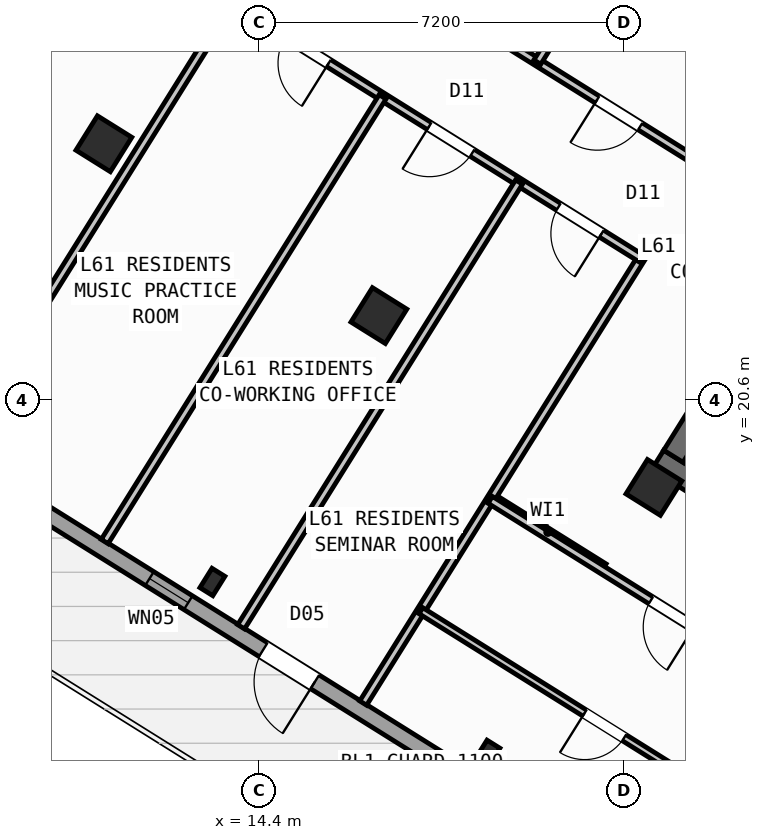
"""IFC4 building model, lengths in metres.
Left out: names, types, materials, properties, quantities, classifications, styles, units other than length and angle.
Written with IfcOpenShell. Run it as: python <this file> out.ifc"""

import sys

from ifc_helpers import new_model, si_unit, direction, frame, frame_2d, origin, origin_2d, place, context, subcontext, project, spatial, rectangle, hollow_rectangle, i_section, extrude, source, transform, mapped, element, fill, save


model = new_model("IFC4")
c1 = context("Model", 3, precision=1e-05, world=origin(), true_north=direction((0.0, 1.0)))
c2 = subcontext(c1, "Body", "Model", "MODEL_VIEW")
j1 = project(units=[si_unit("LENGTHUNIT", "METRE"), si_unit("PLANEANGLEUNIT", "RADIAN")], contexts=[c1])
p1 = place(None, origin())
s1 = spatial("IfcSite", under=j1, at=p1, CompositionType="ELEMENT")
p2 = place(p1, origin())
s2 = spatial("IfcBuilding", under=s1, at=p2, CompositionType="ELEMENT")
p3 = place(p2, frame((0.0, 0.0, 242.1)))
s3 = spatial("IfcBuildingStorey", under=s2, at=p3, CompositionType="ELEMENT", Elevation=242.1)
p4 = place(p3, frame((33.324, 12.503, 0.0), z_axis=(0.0, 0.0, 1.0), x_axis=(-0.848043529849, 0.529926571782, 0.0)))
e1 = element("IfcWall", 1, at=p4, inside=s3, PredefinedType="SHEAR", context=c2, shape_type="SweptSolid", body=[
    extrude(rectangle(XDim=13.04, YDim=0.45, at=frame_2d((6.52, 0.0))), origin(), (0.0, 0.0, 1.0), 3.32),
])
p5 = place(p3, frame((26.007, 24.976, 0.0), z_axis=(0.0, 0.0, 1.0), x_axis=(-0.529931155655, -0.848040665456, 0.0)))
e2 = element("IfcWall", 2, at=p5, inside=s3, PredefinedType="SHEAR", context=c2, shape_type="SweptSolid", body=[
    extrude(rectangle(XDim=6.475, YDim=0.45, at=frame_2d((3.238, 0.0))), origin(), (0.0, 0.0, 1.0), 3.32),
])
m1 = source(origin(), c2, "Body", "SweptSolid", [
    extrude(hollow_rectangle(XDim=0.8, YDim=0.8, WallThickness=0.032, at=origin_2d()), origin(), (0.0, 0.0, 1.0), 3.6),
])
p6 = place(p3, frame((22.191, 18.87, 0.0), z_axis=(0.0, 0.0, 1.0), x_axis=(-0.848048096156, 0.529919264233, 0.0)))
e3 = element("IfcColumn", 3, at=p6, inside=s3, PredefinedType="COLUMN", context=c2, shape_type="MappedRepresentation", body=[
    mapped(m1, transform((0.0, 0.0, 0.0), scale=1.0)),
])
m2 = source(origin(), c2, "Body", "SweptSolid", [
    extrude(i_section(OverallWidth=0.3, OverallDepth=0.45, WebThickness=0.014, FlangeThickness=0.026, at=origin_2d()), origin(), (0.0, 0.0, 1.0), 3.6),
])
p7 = place(p3, frame((18.906, 13.612, 0.0), z_axis=(0.0, 0.0, 1.0), x_axis=(-0.848048096156, 0.529919264233, 0.0)))
e4 = element("IfcColumn", 4, at=p7, inside=s3, PredefinedType="COLUMN", context=c2, shape_type="MappedRepresentation", body=[
    mapped(m2, transform((0.0, 0.0, 0.0), scale=1.0)),
])
p8 = place(p3, frame((16.764, 22.261, 0.0), z_axis=(0.0, 0.0, 1.0), x_axis=(-0.848048096156, 0.529919264233, 0.0)))
e5 = element("IfcColumn", 5, at=p8, inside=s3, PredefinedType="COLUMN", context=c2, shape_type="MappedRepresentation", body=[
    mapped(m1, transform((0.0, 0.0, 0.0), scale=1.0)),
])
p9 = place(p3, frame((13.478, 17.003, 0.0), z_axis=(0.0, 0.0, 1.0), x_axis=(-0.848048096156, 0.529919264233, 0.0)))
e6 = element("IfcColumn", 6, at=p9, inside=s3, PredefinedType="COLUMN", context=c2, shape_type="MappedRepresentation", body=[
    mapped(m2, transform((0.0, 0.0, 0.0), scale=1.0)),
])
p10 = place(p3, frame((11.336, 25.653, 0.0), z_axis=(0.0, 0.0, 1.0), x_axis=(-0.848048096156, 0.529919264233, 0.0)))
e7 = element("IfcColumn", 7, at=p10, inside=s3, PredefinedType="COLUMN", context=c2, shape_type="MappedRepresentation", body=[
    mapped(m1, transform((0.0, 0.0, 0.0), scale=1.0)),
])
p11 = place(p3, frame((29.268, 6.429, 0.0), z_axis=(0.0, 0.0, 1.0), x_axis=(-0.848049971435, 0.529916263149, 0.0)))
e8 = element("IfcWall", 8, at=p11, inside=s3, PredefinedType="STANDARD", context=c2, shape_type="SweptSolid", body=[
    extrude(rectangle(XDim=31.588, YDim=0.32, at=frame_2d((15.794, 0.0))), origin(), (0.0, 0.0, 1.0), 3.32),
])
p12 = place(p11, frame((16.235, 0.0, 0.0)))
e9 = element("IfcOpeningElement", 9, at=p12, cuts=e8, PredefinedType="OPENING", context=c2, shape_type="SweptSolid", body=[
    extrude(rectangle(XDim=1.2, YDim=2.15, at=frame_2d((0.6, 1.075))), frame((0.0, 0.17, 0.0), z_axis=(0.0, -1.0, 0.0), x_axis=(1.0, 0.0, 0.0)), (0.0, 0.0, 1.0), 0.34),
])
p13 = place(p11, frame((3.859, 0.0, 0.9)))
e10 = element("IfcOpeningElement", 10, at=p13, cuts=e8, PredefinedType="OPENING", context=c2, shape_type="SweptSolid", body=[
    extrude(rectangle(XDim=1.65, YDim=1.45, at=frame_2d((0.825, 0.725))), frame((0.0, 0.17, 0.0), z_axis=(0.0, -1.0, 0.0), x_axis=(1.0, 0.0, 0.0)), (0.0, 0.0, 1.0), 0.34),
])
p14 = place(p11, frame((10.519, 0.0, 0.9)))
e11 = element("IfcOpeningElement", 11, at=p14, cuts=e8, PredefinedType="OPENING", context=c2, shape_type="SweptSolid", body=[
    extrude(rectangle(XDim=1.65, YDim=1.45, at=frame_2d((0.825, 0.725))), frame((0.0, 0.17, 0.0), z_axis=(0.0, -1.0, 0.0), x_axis=(1.0, 0.0, 0.0)), (0.0, 0.0, 1.0), 0.34),
])
p15 = place(p11, frame((19.182, 0.0, 1.0)))
e12 = element("IfcOpeningElement", 12, at=p15, cuts=e8, PredefinedType="OPENING", context=c2, shape_type="SweptSolid", body=[
    extrude(rectangle(XDim=0.9, YDim=1.25, at=frame_2d((0.45, 0.625))), frame((0.0, 0.17, 0.0), z_axis=(0.0, -1.0, 0.0), x_axis=(1.0, 0.0, 0.0)), (0.0, 0.0, 1.0), 0.34),
])
p16 = place(p11, frame((22.524, 0.0, 1.0)))
e13 = element("IfcOpeningElement", 13, at=p16, cuts=e8, PredefinedType="OPENING", context=c2, shape_type="SweptSolid", body=[
    extrude(rectangle(XDim=0.9, YDim=1.25, at=frame_2d((0.45, 0.625))), frame((0.0, 0.17, 0.0), z_axis=(0.0, -1.0, 0.0), x_axis=(1.0, 0.0, 0.0)), (0.0, 0.0, 1.0), 0.34),
])
p17 = place(p11, frame((25.658, 0.0, 0.9)))
e14 = element("IfcOpeningElement", 14, at=p17, cuts=e8, PredefinedType="OPENING", context=c2, shape_type="SweptSolid", body=[
    extrude(rectangle(XDim=1.65, YDim=1.45, at=frame_2d((0.825, 0.725))), frame((0.0, 0.17, 0.0), z_axis=(0.0, -1.0, 0.0), x_axis=(1.0, 0.0, 0.0)), (0.0, 0.0, 1.0), 0.34),
])
p18 = place(p11, frame((29.278, 0.0, 0.9)))
e15 = element("IfcOpeningElement", 15, at=p18, cuts=e8, PredefinedType="OPENING", context=c2, shape_type="SweptSolid", body=[
    extrude(rectangle(XDim=1.35, YDim=1.45, at=frame_2d((0.675, 0.725))), frame((0.0, 0.17, 0.0), z_axis=(0.0, -1.0, 0.0), x_axis=(1.0, 0.0, 0.0)), (0.0, 0.0, 1.0), 0.34),
])
p19 = place(p3, frame((2.415, 23.452, 0.0), z_axis=(0.0, 0.0, 1.0), x_axis=(0.52991049553, 0.848053575387, 0.0)))
e16 = element("IfcWall", 16, at=p19, inside=s3, PredefinedType="STANDARD", context=c2, shape_type="SweptSolid", body=[
    extrude(rectangle(XDim=21.587, YDim=0.32, at=frame_2d((10.794, 0.0))), origin(), (0.0, 0.0, 1.0), 2.845),
])
p20 = place(p19, frame((2.581, 0.0, 0.9)))
e17 = element("IfcOpeningElement", 17, at=p20, cuts=e16, PredefinedType="OPENING", context=c2, shape_type="SweptSolid", body=[
    extrude(rectangle(XDim=1.65, YDim=1.45, at=frame_2d((0.825, 0.725))), frame((0.0, 0.17, 0.0), z_axis=(0.0, -1.0, 0.0), x_axis=(1.0, 0.0, 0.0)), (0.0, 0.0, 1.0), 0.34),
])
p21 = place(p19, frame((7.879, 0.0, 0.9)))
e18 = element("IfcOpeningElement", 18, at=p21, cuts=e16, PredefinedType="OPENING", context=c2, shape_type="SweptSolid", body=[
    extrude(rectangle(XDim=1.35, YDim=1.45, at=frame_2d((0.675, 0.725))), frame((0.0, 0.17, 0.0), z_axis=(0.0, -1.0, 0.0), x_axis=(1.0, 0.0, 0.0)), (0.0, 0.0, 1.0), 0.34),
])
p22 = place(p19, frame((16.954, 0.0, 0.95)))
e19 = element("IfcOpeningElement", 19, at=p22, cuts=e16, PredefinedType="OPENING", context=c2, shape_type="SweptSolid", body=[
    extrude(rectangle(XDim=1.95, YDim=1.35, at=frame_2d((0.975, 0.675))), frame((0.0, 0.17, 0.0), z_axis=(0.0, -1.0, 0.0), x_axis=(1.0, 0.0, 0.0)), (0.0, 0.0, 1.0), 0.34),
])
p23 = place(p3, frame((14.138, 41.825, 0.0), z_axis=(0.0, 0.0, 1.0), x_axis=(0.848046498049, -0.529921821731, 0.0)))
e20 = element("IfcWall", 20, at=p23, inside=s3, PredefinedType="STANDARD", context=c2, shape_type="SweptSolid", body=[
    extrude(rectangle(XDim=31.588, YDim=0.32, at=frame_2d((15.794, 0.0))), origin(), (0.0, 0.0, 1.0), 3.32),
])
p24 = place(p23, frame((9.712, 0.0, 0.0)))
e21 = element("IfcOpeningElement", 21, at=p24, cuts=e20, PredefinedType="OPENING", context=c2, shape_type="SweptSolid", body=[
    extrude(rectangle(XDim=1.05, YDim=2.15, at=frame_2d((0.525, 1.075))), frame((0.0, 0.17, 0.0), z_axis=(0.0, -1.0, 0.0), x_axis=(1.0, 0.0, 0.0)), (0.0, 0.0, 1.0), 0.34),
])
p25 = place(p23, frame((0.841, 0.0, 0.9)))
e22 = element("IfcOpeningElement", 22, at=p25, cuts=e20, PredefinedType="OPENING", context=c2, shape_type="SweptSolid", body=[
    extrude(rectangle(XDim=1.65, YDim=1.45, at=frame_2d((0.825, 0.725))), frame((0.0, 0.17, 0.0), z_axis=(0.0, -1.0, 0.0), x_axis=(1.0, 0.0, 0.0)), (0.0, 0.0, 1.0), 0.34),
])
p26 = place(p23, frame((4.171, 0.0, 1.0)))
e23 = element("IfcOpeningElement", 23, at=p26, cuts=e20, PredefinedType="OPENING", context=c2, shape_type="SweptSolid", body=[
    extrude(rectangle(XDim=0.9, YDim=1.25, at=frame_2d((0.45, 0.625))), frame((0.0, 0.17, 0.0), z_axis=(0.0, -1.0, 0.0), x_axis=(1.0, 0.0, 0.0)), (0.0, 0.0, 1.0), 0.34),
])
p27 = place(p23, frame((13.624, 0.0, 0.95)))
e24 = element("IfcOpeningElement", 24, at=p27, cuts=e20, PredefinedType="OPENING", context=c2, shape_type="SweptSolid", body=[
    extrude(rectangle(XDim=1.95, YDim=1.35, at=frame_2d((0.975, 0.675))), frame((0.0, 0.17, 0.0), z_axis=(0.0, -1.0, 0.0), x_axis=(1.0, 0.0, 0.0)), (0.0, 0.0, 1.0), 0.34),
])
p28 = place(p23, frame((17.129, 0.0, 1.0)))
e25 = element("IfcOpeningElement", 25, at=p28, cuts=e20, PredefinedType="OPENING", context=c2, shape_type="SweptSolid", body=[
    extrude(rectangle(XDim=0.9, YDim=1.25, at=frame_2d((0.45, 0.625))), frame((0.0, 0.17, 0.0), z_axis=(0.0, -1.0, 0.0), x_axis=(1.0, 0.0, 0.0)), (0.0, 0.0, 1.0), 0.34),
])
p29 = place(p23, frame((21.744, 0.0, 0.9)))
e26 = element("IfcOpeningElement", 26, at=p29, cuts=e20, PredefinedType="OPENING", context=c2, shape_type="SweptSolid", body=[
    extrude(rectangle(XDim=1.65, YDim=1.45, at=frame_2d((0.825, 0.725))), frame((0.0, 0.17, 0.0), z_axis=(0.0, -1.0, 0.0), x_axis=(1.0, 0.0, 0.0)), (0.0, 0.0, 1.0), 0.34),
])
p30 = place(p23, frame((27.394, 0.0, 0.9)))
e27 = element("IfcOpeningElement", 27, at=p30, cuts=e20, PredefinedType="OPENING", context=c2, shape_type="SweptSolid", body=[
    extrude(rectangle(XDim=1.65, YDim=1.45, at=frame_2d((0.825, 0.725))), frame((0.0, 0.17, 0.0), z_axis=(0.0, -1.0, 0.0), x_axis=(1.0, 0.0, 0.0)), (0.0, 0.0, 1.0), 0.34),
])
p31 = place(p3, frame((21.206, 17.292, 0.0), z_axis=(0.0, 0.0, 1.0), x_axis=(-0.848050851465, 0.529914854792, 0.0)))
e28 = element("IfcWall", 28, at=p31, inside=s3, PredefinedType="PARTITIONING", context=c2, shape_type="SweptSolid", body=[
    extrude(rectangle(XDim=2.61, YDim=0.16, at=frame_2d((1.305, 0.0))), origin(), (0.0, 0.0, 1.0), 3.31),
])
p32 = place(p3, frame((21.938, 23.391, 0.0), z_axis=(0.0, 0.0, 1.0), x_axis=(-0.529924725692, -0.848044683434, 0.0)))
e29 = element("IfcWall", 29, at=p32, inside=s3, PredefinedType="PARTITIONING", context=c2, shape_type="SweptSolid", body=[
    extrude(rectangle(XDim=10.35, YDim=0.16, at=frame_2d((5.175, 0.0))), origin(), (0.0, 0.0, 1.0), 3.31),
])
p33 = place(p3, frame((23.104, 25.256, 0.0), z_axis=(0.0, 0.0, 1.0), x_axis=(-0.848041752158, 0.529929416617, 0.0)))
e30 = element("IfcWall", 30, at=p33, inside=s3, PredefinedType="PARTITIONING", context=c2, shape_type="SweptSolid", body=[
    extrude(rectangle(XDim=16.73, YDim=0.16, at=frame_2d((8.365, 0.0))), origin(), (0.0, 0.0, 1.0), 3.31),
])
p34 = place(p33, frame((1.395, 0.0, 0.0)))
e31 = element("IfcOpeningElement", 31, at=p34, cuts=e30, PredefinedType="OPENING", context=c2, shape_type="SweptSolid", body=[
    extrude(rectangle(XDim=1.0, YDim=2.1, at=frame_2d((0.5, 1.05))), frame((0.0, 0.09, 0.0), z_axis=(0.0, -1.0, 0.0), x_axis=(1.0, 0.0, 0.0)), (0.0, 0.0, 1.0), 0.18),
])
p35 = place(p33, frame((7.82, 0.0, 0.0)))
e32 = element("IfcOpeningElement", 32, at=p35, cuts=e30, PredefinedType="OPENING", context=c2, shape_type="SweptSolid", body=[
    extrude(rectangle(XDim=1.0, YDim=2.1, at=frame_2d((0.5, 1.05))), frame((0.0, 0.09, 0.0), z_axis=(0.0, -1.0, 0.0), x_axis=(1.0, 0.0, 0.0)), (0.0, 0.0, 1.0), 0.18),
])
p36 = place(p33, frame((11.14, 0.0, 0.0)))
e33 = element("IfcOpeningElement", 33, at=p36, cuts=e30, PredefinedType="OPENING", context=c2, shape_type="SweptSolid", body=[
    extrude(rectangle(XDim=1.0, YDim=2.1, at=frame_2d((0.5, 1.05))), frame((0.0, 0.09, 0.0), z_axis=(0.0, -1.0, 0.0), x_axis=(1.0, 0.0, 0.0)), (0.0, 0.0, 1.0), 0.18),
])
p37 = place(p3, frame((21.938, 23.391, 0.0), z_axis=(0.0, 0.0, 1.0), x_axis=(-0.848045850158, 0.529922858565, 0.0)))
e34 = element("IfcWall", 34, at=p37, inside=s3, PredefinedType="PARTITIONING", context=c2, shape_type="SweptSolid", body=[
    extrude(rectangle(XDim=16.73, YDim=0.16, at=frame_2d((8.365, 0.0))), origin(), (0.0, 0.0, 1.0), 3.31),
])
p38 = place(p37, frame((0.92, 0.0, 0.0)))
e35 = element("IfcOpeningElement", 35, at=p38, cuts=e34, PredefinedType="OPENING", context=c2, shape_type="SweptSolid", body=[
    extrude(rectangle(XDim=1.0, YDim=2.1, at=frame_2d((0.5, 1.05))), frame((0.0, 0.09, 0.0), z_axis=(0.0, -1.0, 0.0), x_axis=(1.0, 0.0, 0.0)), (0.0, 0.0, 1.0), 0.18),
])
p39 = place(p37, frame((3.928, 0.0, 0.0)))
e36 = element("IfcOpeningElement", 36, at=p39, cuts=e34, PredefinedType="OPENING", context=c2, shape_type="SweptSolid", body=[
    extrude(rectangle(XDim=1.0, YDim=2.1, at=frame_2d((0.5, 1.05))), frame((0.0, 0.09, 0.0), z_axis=(0.0, -1.0, 0.0), x_axis=(1.0, 0.0, 0.0)), (0.0, 0.0, 1.0), 0.18),
])
p40 = place(p37, frame((7.271, 0.0, 0.0)))
e37 = element("IfcOpeningElement", 37, at=p40, cuts=e34, PredefinedType="OPENING", context=c2, shape_type="SweptSolid", body=[
    extrude(rectangle(XDim=1.0, YDim=2.1, at=frame_2d((0.5, 1.05))), frame((0.0, 0.09, 0.0), z_axis=(0.0, -1.0, 0.0), x_axis=(1.0, 0.0, 0.0)), (0.0, 0.0, 1.0), 0.18),
])
p41 = place(p37, frame((10.78, 0.0, 0.0)))
e38 = element("IfcOpeningElement", 38, at=p41, cuts=e34, PredefinedType="OPENING", context=c2, shape_type="SweptSolid", body=[
    extrude(rectangle(XDim=1.0, YDim=2.1, at=frame_2d((0.5, 1.05))), frame((0.0, 0.09, 0.0), z_axis=(0.0, -1.0, 0.0), x_axis=(1.0, 0.0, 0.0)), (0.0, 0.0, 1.0), 0.18),
])
p42 = place(p37, frame((14.372, 0.0, 0.0)))
e39 = element("IfcOpeningElement", 39, at=p42, cuts=e34, PredefinedType="OPENING", context=c2, shape_type="SweptSolid", body=[
    extrude(rectangle(XDim=1.0, YDim=2.1, at=frame_2d((0.5, 1.05))), frame((0.0, 0.09, 0.0), z_axis=(0.0, -1.0, 0.0), x_axis=(1.0, 0.0, 0.0)), (0.0, 0.0, 1.0), 0.18),
])
p43 = place(p3, frame((19.529, 24.896, 0.0), z_axis=(0.0, 0.0, 1.0), x_axis=(-0.529914125013, -0.848051307476, 0.0)))
e40 = element("IfcWall", 40, at=p43, inside=s3, PredefinedType="PARTITIONING", context=c2, shape_type="SweptSolid", body=[
    extrude(rectangle(XDim=10.35, YDim=0.16, at=frame_2d((5.175, 0.0))), origin(), (0.0, 0.0, 1.0), 3.31),
])
p44 = place(p3, frame((16.837, 26.579, 0.0), z_axis=(0.0, 0.0, 1.0), x_axis=(-0.529941690036, -0.848034082547, 0.0)))
e41 = element("IfcWall", 41, at=p44, inside=s3, PredefinedType="PARTITIONING", context=c2, shape_type="SweptSolid", body=[
    extrude(rectangle(XDim=10.35, YDim=0.16, at=frame_2d((5.175, 0.0))), origin(), (0.0, 0.0, 1.0), 2.935),
])
p45 = place(p3, frame((13.861, 28.438, 0.0), z_axis=(0.0, 0.0, 1.0), x_axis=(-0.529931089283, -0.848040706931, 0.0)))
e42 = element("IfcWall", 42, at=p45, inside=s3, PredefinedType="PARTITIONING", context=c2, shape_type="SweptSolid", body=[
    extrude(rectangle(XDim=10.35, YDim=0.16, at=frame_2d((5.175, 0.0))), origin(), (0.0, 0.0, 1.0), 3.31),
])
p46 = place(p3, frame((10.885, 30.298, 0.0), z_axis=(0.0, 0.0, 1.0), x_axis=(-0.529924725692, -0.848044683434, 0.0)))
e43 = element("IfcWall", 43, at=p46, inside=s3, PredefinedType="PARTITIONING", context=c2, shape_type="SweptSolid", body=[
    extrude(rectangle(XDim=10.35, YDim=0.16, at=frame_2d((5.175, 0.0))), origin(), (0.0, 0.0, 1.0), 3.31),
])
p47 = place(p3, frame((20.414, 28.103, 0.0), z_axis=(0.0, 0.0, 1.0), x_axis=(-0.529998940003, -0.847998304005, 0.0)))
e44 = element("IfcWall", 44, at=p47, inside=s3, PredefinedType="PARTITIONING", context=c2, shape_type="SweptSolid", body=[
    extrude(rectangle(XDim=0.988, YDim=0.16, at=frame_2d((0.494, 0.0))), origin(), (0.0, 0.0, 1.0), 2.845),
])
p48 = place(p3, frame((32.164, 10.374, 0.0), z_axis=(0.0, 0.0, 1.0), x_axis=(-0.848044107957, 0.529925646633, 0.0)))
e45 = element("IfcWall", 45, at=p48, inside=s3, PredefinedType="PARTITIONING", context=c2, shape_type="SweptSolid", body=[
    extrude(rectangle(XDim=15.57, YDim=0.16, at=frame_2d((7.785, 0.0))), origin(), (0.0, 0.0, 1.0), 3.31),
])
p49 = place(p48, frame((10.83, 0.0, 0.0)))
e46 = element("IfcOpeningElement", 46, at=p49, cuts=e45, PredefinedType="OPENING", context=c2, shape_type="SweptSolid", body=[
    extrude(rectangle(XDim=1.0, YDim=2.1, at=frame_2d((0.5, 1.05))), frame((0.0, 0.09, 0.0), z_axis=(0.0, -1.0, 0.0), x_axis=(1.0, 0.0, 0.0)), (0.0, 0.0, 1.0), 0.18),
])
p50 = place(p3, frame((29.72, 8.859, 0.0), z_axis=(0.0, 0.0, 1.0), x_axis=(-0.848049134363, 0.529917602752, 0.0)))
e47 = element("IfcWall", 47, at=p50, inside=s3, PredefinedType="PLUMBINGWALL", context=c2, shape_type="SweptSolid", body=[
    extrude(rectangle(XDim=14.3, YDim=0.14, at=frame_2d((7.15, 0.0))), origin(), (0.0, 0.0, 1.0), 3.31),
])
p51 = place(p50, frame((9.57, 0.0, 0.0)))
e48 = element("IfcOpeningElement", 48, at=p51, cuts=e47, PredefinedType="OPENING", context=c2, shape_type="SweptSolid", body=[
    extrude(rectangle(XDim=0.92, YDim=2.08, at=frame_2d((0.46, 1.04))), frame((0.0, 0.08, 0.0), z_axis=(0.0, -1.0, 0.0), x_axis=(1.0, 0.0, 0.0)), (0.0, 0.0, 1.0), 0.16),
])
m3 = source(origin(), c2, "Body", "SweptSolid", [
    extrude(rectangle(XDim=1.2, YDim=2.15, at=frame_2d((0.6, 1.075))), frame((0.0, 0.025, 0.0), z_axis=(0.0, -1.0, 0.0), x_axis=(1.0, 0.0, 0.0)), (0.0, 0.0, 1.0), 0.05),
])
p52 = place(p12, origin())
e49 = element("IfcDoor", 49, at=p52, inside=s3, OperationType="SINGLE_SWING_LEFT", PredefinedType="DOOR", context=c2, shape_type="MappedRepresentation", body=[
    mapped(m3, transform((0.0, 0.0, 0.0), scale=1.0)),
])
fill(e9, e49)
m4 = source(origin(), c2, "Body", "SweptSolid", [
    extrude(rectangle(XDim=0.9, YDim=1.25, at=frame_2d((0.45, 0.625))), frame((0.0, 0.03, 0.0), z_axis=(0.0, -1.0, 0.0), x_axis=(1.0, 0.0, 0.0)), (0.0, 0.0, 1.0), 0.06),
])
p53 = place(p15, origin())
e50 = element("IfcWindow", 50, at=p53, inside=s3, PartitioningType="SINGLE_PANEL", PredefinedType="WINDOW", context=c2, shape_type="MappedRepresentation", body=[
    mapped(m4, transform((0.0, 0.0, 0.0), scale=1.0)),
])
fill(e12, e50)
m5 = source(origin(), c2, "Body", "SweptSolid", [
    extrude(rectangle(XDim=1.0, YDim=2.1, at=frame_2d((0.5, 1.05))), frame((0.0, 0.025, 0.0), z_axis=(0.0, -1.0, 0.0), x_axis=(1.0, 0.0, 0.0)), (0.0, 0.0, 1.0), 0.05),
])
p54 = place(p38, origin())
e51 = element("IfcDoor", 51, at=p54, inside=s3, OperationType="SINGLE_SWING_LEFT", PredefinedType="DOOR", context=c2, shape_type="MappedRepresentation", body=[
    mapped(m5, transform((0.0, 0.0, 0.0), scale=1.0)),
])
fill(e35, e51)
p55 = place(p39, origin())
e52 = element("IfcDoor", 52, at=p55, inside=s3, OperationType="SINGLE_SWING_RIGHT", PredefinedType="DOOR", context=c2, shape_type="MappedRepresentation", body=[
    mapped(m5, transform((0.0, 0.0, 0.0), scale=1.0)),
])
fill(e36, e52)
p56 = place(p40, origin())
e53 = element("IfcDoor", 53, at=p56, inside=s3, OperationType="SINGLE_SWING_LEFT", PredefinedType="DOOR", context=c2, shape_type="MappedRepresentation", body=[
    mapped(m5, transform((0.0, 0.0, 0.0), scale=1.0)),
])
fill(e37, e53)
p57 = place(p34, origin())
e54 = element("IfcDoor", 54, at=p57, inside=s3, OperationType="SINGLE_SWING_RIGHT", PredefinedType="DOOR", context=c2, shape_type="MappedRepresentation", body=[
    mapped(m5, transform((0.0, 0.0, 0.0), scale=1.0)),
])
fill(e31, e54)
p58 = place(p49, origin())
e55 = element("IfcDoor", 55, at=p58, inside=s3, OperationType="SINGLE_SWING_LEFT", PredefinedType="DOOR", context=c2, shape_type="MappedRepresentation", body=[
    mapped(m5, transform((0.0, 0.0, 0.0), scale=1.0)),
])
fill(e46, e55)
m6 = source(origin(), c2, "Body", "SweptSolid", [
    extrude(rectangle(XDim=0.92, YDim=2.08, at=frame_2d((0.46, 1.04))), frame((0.0, 0.025, 0.0), z_axis=(0.0, -1.0, 0.0), x_axis=(1.0, 0.0, 0.0)), (0.0, 0.0, 1.0), 0.05),
])
p59 = place(p51, origin())
e56 = element("IfcDoor", 56, at=p59, inside=s3, OperationType="SINGLE_SWING_RIGHT", PredefinedType="DOOR", context=c2, shape_type="MappedRepresentation", body=[
    mapped(m6, transform((0.0, 0.0, 0.0), scale=1.0)),
])
fill(e48, e56)
save(model, sys.argv[1])
